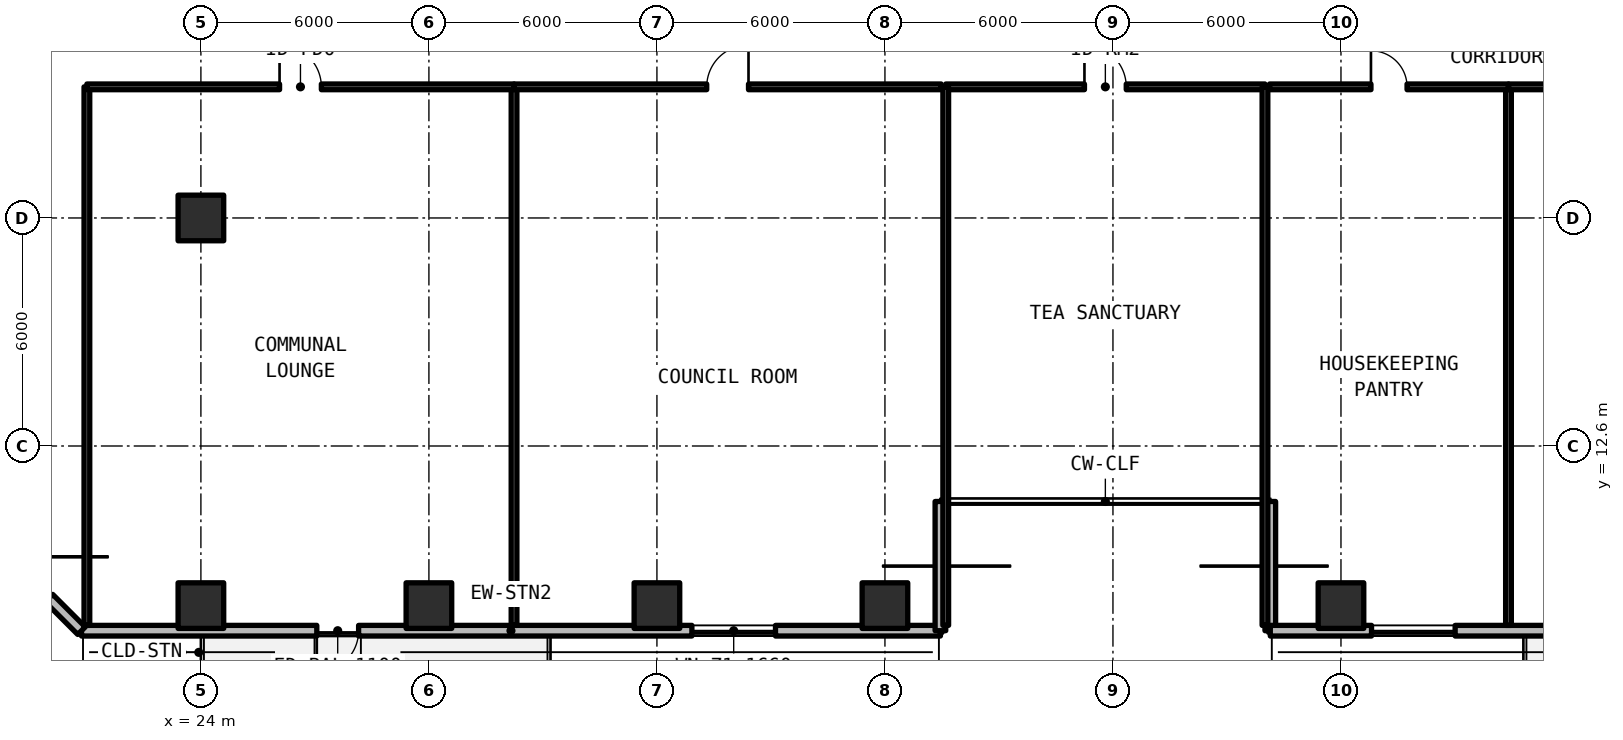
"""IFC4 building model, lengths in metres.
Left out: names, types, materials, properties, quantities, classifications, styles, units other than length and angle.
Written with IfcOpenShell. Run it as: python <this file> out.ifc"""

import sys

from ifc_helpers import new_model, si_unit, direction, frame, frame_2d, origin, origin_2d, place, context, subcontext, project, spatial, rectangle, extrude, element, fill, save


model = new_model("IFC4")
c1 = context("Model", 3, precision=1e-05, world=origin(), true_north=direction((0.0, 1.0)))
c2 = subcontext(c1, "Body", "Model", "MODEL_VIEW")
j1 = project(units=[si_unit("LENGTHUNIT", "METRE"), si_unit("PLANEANGLEUNIT", "RADIAN")], contexts=[c1])
p1 = place(None, origin())
s1 = spatial("IfcSite", under=j1, at=p1, CompositionType="ELEMENT")
p2 = place(p1, origin())
s2 = spatial("IfcBuilding", under=s1, at=p2, CompositionType="ELEMENT")
p3 = place(p2, frame((0.0, 0.0, 42.24)))
s3 = spatial("IfcBuildingStorey", under=s2, at=p3, CompositionType="ELEMENT", Elevation=42.24)
for number, where, z_axis, x_axis in (
    (1, (24.0, 18.6, 0.0), (0.0, 0.0, 1.0), (1.0, 0.0, 0.0)),
    (2, (24.0, 8.4, 0.0), (0.0, 0.0, 1.0), (1.0, 0.0, 0.0)),
    (3, (30.0, 8.4, 0.0), (0.0, 0.0, 1.0), (1.0, 0.0, 0.0)),
    (4, (36.0, 8.4, 0.0), (0.0, 0.0, 1.0), (1.0, 0.0, 0.0)),
    (5, (42.0, 8.4, 0.0), (0.0, 0.0, 1.0), (1.0, 0.0, 0.0)),
    (6, (54.0, 8.4, 0.0), (0.0, 0.0, 1.0), (1.0, 0.0, 0.0)),
):
    element("IfcColumn", number, at=place(p3, frame(where, z_axis=z_axis, x_axis=x_axis)), inside=s3, PredefinedType="COLUMN", context=c2, shape_type="SweptSolid", body=[
        extrude(rectangle(XDim=1.2, YDim=1.2, at=origin_2d()), origin(), (0.0, 0.0, 1.0), 3.3),
    ])
p4 = place(p3, frame((20.858, 7.74, 0.0), z_axis=(0.0, 0.0, 1.0), x_axis=(1.0, 0.0, 0.0)))
e7 = element("IfcWall", 7, at=p4, inside=s3, PredefinedType="SOLIDWALL", context=c2, shape_type="SweptSolid", body=[
    extrude(rectangle(XDim=22.602, YDim=0.28, at=frame_2d((11.301, 0.0))), origin(), (0.0, 0.0, 1.0), 3.08),
])
p5 = place(p4, frame((6.192, 0.0, 0.0)))
e8 = element("IfcOpeningElement", 8, at=p5, cuts=e7, PredefinedType="OPENING", context=c2, shape_type="SweptSolid", body=[
    extrude(rectangle(XDim=1.1, YDim=2.15, at=frame_2d((0.55, 1.075))), frame((0.0, 0.15, 0.0), z_axis=(0.0, -1.0, 0.0), x_axis=(1.0, 0.0, 0.0)), (0.0, 0.0, 1.0), 0.3),
])
p6 = place(p4, frame((16.062, 0.0, 0.78)))
e9 = element("IfcOpeningElement", 9, at=p6, cuts=e7, PredefinedType="OPENING", context=c2, shape_type="SweptSolid", body=[
    extrude(rectangle(XDim=2.2, YDim=1.66, at=frame_2d((1.1, 0.83))), frame((0.0, 0.15, 0.0), z_axis=(0.0, -1.0, 0.0), x_axis=(1.0, 0.0, 0.0)), (0.0, 0.0, 1.0), 0.3),
])
for number, where, z_axis, x_axis in (
    (10, (43.46, 7.74, 0.0), (0.0, 0.0, 1.0), (0.0, 1.0, 0.0)),
    (11, (52.14, 11.14, 0.0), (0.0, 0.0, 1.0), (0.0, -1.0, 0.0)),
):
    element("IfcWall", number, at=place(p3, frame(where, z_axis=z_axis, x_axis=x_axis)), inside=s3, PredefinedType="SOLIDWALL", context=c2, shape_type="SweptSolid", body=[
        extrude(rectangle(XDim=3.4, YDim=0.28, at=frame_2d((1.7, 0.0))), origin(), (0.0, 0.0, 1.0), 3.08),
    ])
p7 = place(p3, frame((52.14, 7.74, 0.0), z_axis=(0.0, 0.0, 1.0), x_axis=(1.0, 0.0, 0.0)))
e12 = element("IfcWall", 12, at=p7, inside=s3, PredefinedType="SOLIDWALL", context=c2, shape_type="SweptSolid", body=[
    extrude(rectangle(XDim=44.402, YDim=0.28, at=frame_2d((22.201, 0.0))), origin(), (0.0, 0.0, 1.0), 3.08),
])
p8 = place(p7, frame((10.71, 0.0, 0.0)))
e13 = element("IfcOpeningElement", 13, at=p8, cuts=e12, PredefinedType="OPENING", context=c2, shape_type="SweptSolid", body=[
    extrude(rectangle(XDim=1.1, YDim=2.15, at=frame_2d((0.55, 1.075))), frame((0.0, 0.15, 0.0), z_axis=(0.0, -1.0, 0.0), x_axis=(1.0, 0.0, 0.0)), (0.0, 0.0, 1.0), 0.3),
])
p9 = place(p7, frame((22.31, 0.0, 0.0)))
e14 = element("IfcOpeningElement", 14, at=p9, cuts=e12, PredefinedType="OPENING", context=c2, shape_type="SweptSolid", body=[
    extrude(rectangle(XDim=1.1, YDim=2.15, at=frame_2d((0.55, 1.075))), frame((0.0, 0.15, 0.0), z_axis=(0.0, -1.0, 0.0), x_axis=(1.0, 0.0, 0.0)), (0.0, 0.0, 1.0), 0.3),
])
p10 = place(p7, frame((33.91, 0.0, 0.0)))
e15 = element("IfcOpeningElement", 15, at=p10, cuts=e12, PredefinedType="OPENING", context=c2, shape_type="SweptSolid", body=[
    extrude(rectangle(XDim=1.1, YDim=2.15, at=frame_2d((0.55, 1.075))), frame((0.0, 0.15, 0.0), z_axis=(0.0, -1.0, 0.0), x_axis=(1.0, 0.0, 0.0)), (0.0, 0.0, 1.0), 0.3),
])
p11 = place(p7, frame((2.664, 0.0, 0.78)))
e16 = element("IfcOpeningElement", 16, at=p11, cuts=e12, PredefinedType="OPENING", context=c2, shape_type="SweptSolid", body=[
    extrude(rectangle(XDim=2.2, YDim=1.66, at=frame_2d((1.1, 0.83))), frame((0.0, 0.15, 0.0), z_axis=(0.0, -1.0, 0.0), x_axis=(1.0, 0.0, 0.0)), (0.0, 0.0, 1.0), 0.3),
])
p12 = place(p7, frame((28.534, 0.0, 0.78)))
e17 = element("IfcOpeningElement", 17, at=p12, cuts=e12, PredefinedType="OPENING", context=c2, shape_type="SweptSolid", body=[
    extrude(rectangle(XDim=2.2, YDim=1.66, at=frame_2d((1.1, 0.83))), frame((0.0, 0.15, 0.0), z_axis=(0.0, -1.0, 0.0), x_axis=(1.0, 0.0, 0.0)), (0.0, 0.0, 1.0), 0.3),
])
p13 = place(p7, frame((38.548, 0.0, 0.78)))
e18 = element("IfcOpeningElement", 18, at=p13, cuts=e12, PredefinedType="OPENING", context=c2, shape_type="SweptSolid", body=[
    extrude(rectangle(XDim=0.85, YDim=1.65, at=frame_2d((0.425, 0.825))), frame((0.0, 0.15, 0.0), z_axis=(0.0, -1.0, 0.0), x_axis=(1.0, 0.0, 0.0)), (0.0, 0.0, 1.0), 0.3),
])
p14 = place(p7, frame((40.91, 0.0, 0.78)))
e19 = element("IfcOpeningElement", 19, at=p14, cuts=e12, PredefinedType="OPENING", context=c2, shape_type="SweptSolid", body=[
    extrude(rectangle(XDim=2.2, YDim=1.66, at=frame_2d((1.1, 0.83))), frame((0.0, 0.15, 0.0), z_axis=(0.0, -1.0, 0.0), x_axis=(1.0, 0.0, 0.0)), (0.0, 0.0, 1.0), 0.3),
])
p15 = place(p3, frame((16.74, 11.858, 0.0), z_axis=(0.0, 0.0, 1.0), x_axis=(0.707106781187, -0.707106781187, 0.0)))
e20 = element("IfcWall", 20, at=p15, inside=s3, PredefinedType="SOLIDWALL", context=c2, shape_type="SweptSolid", body=[
    extrude(rectangle(XDim=5.824, YDim=0.28, at=frame_2d((2.912, 0.0))), origin(), (0.0, 0.0, 1.0), 3.08),
])
p16 = place(p15, frame((1.212, 0.0, 0.78)))
e21 = element("IfcOpeningElement", 21, at=p16, cuts=e20, PredefinedType="OPENING", context=c2, shape_type="SweptSolid", body=[
    extrude(rectangle(XDim=3.4, YDim=1.66, at=frame_2d((1.7, 0.83))), frame((0.0, 0.15, 0.0), z_axis=(0.0, -1.0, 0.0), x_axis=(1.0, 0.0, 0.0)), (0.0, 0.0, 1.0), 0.3),
])
p17 = place(p3, frame((43.6, 22.05, 0.0), z_axis=(0.0, 0.0, 1.0), x_axis=(1.0, 0.0, 0.0)))
e22 = element("IfcWall", 22, at=p17, inside=s3, PredefinedType="SOLIDWALL", context=c2, shape_type="SweptSolid", body=[
    extrude(rectangle(XDim=8.4, YDim=0.15, at=frame_2d((4.2, 0.0))), origin(), (0.0, 0.0, 1.0), 2.35),
])
p18 = place(p17, frame((3.65, 0.0, 0.0)))
e23 = element("IfcOpeningElement", 23, at=p18, cuts=e22, PredefinedType="OPENING", context=c2, shape_type="SweptSolid", body=[
    extrude(rectangle(XDim=1.1, YDim=2.15, at=frame_2d((0.55, 1.075))), frame((0.0, 0.085, 0.0), z_axis=(0.0, -1.0, 0.0), x_axis=(1.0, 0.0, 0.0)), (0.0, 0.0, 1.0), 0.17),
])
for number, where, z_axis, x_axis in (
    (24, (43.6, 7.88, 0.0), (0.0, 0.0, 1.0), (0.0, 1.0, 0.0)),
    (25, (52.0, 7.88, 0.0), (0.0, 0.0, 1.0), (0.0, 1.0, 0.0)),
    (26, (21.0, 7.88, 0.0), (0.0, 0.0, 1.0), (0.0, 1.0, 0.0)),
    (27, (32.24, 7.88, 0.0), (0.0, 0.0, 1.0), (0.0, 1.0, 0.0)),
):
    element("IfcWall", number, at=place(p3, frame(where, z_axis=z_axis, x_axis=x_axis)), inside=s3, PredefinedType="SOLIDWALL", context=c2, shape_type="SweptSolid", body=[
        extrude(rectangle(XDim=14.17, YDim=0.15, at=frame_2d((7.085, 0.0))), origin(), (0.0, 0.0, 1.0), 2.35),
    ])
p19 = place(p3, frame((21.0, 22.05, 0.0), z_axis=(0.0, 0.0, 1.0), x_axis=(1.0, 0.0, 0.0)))
e28 = element("IfcWall", 28, at=p19, inside=s3, PredefinedType="SOLIDWALL", context=c2, shape_type="SweptSolid", body=[
    extrude(rectangle(XDim=11.24, YDim=0.15, at=frame_2d((5.62, 0.0))), origin(), (0.0, 0.0, 1.0), 2.35),
])
p20 = place(p19, frame((5.07, 0.0, 0.0)))
e29 = element("IfcOpeningElement", 29, at=p20, cuts=e28, PredefinedType="OPENING", context=c2, shape_type="SweptSolid", body=[
    extrude(rectangle(XDim=1.1, YDim=2.15, at=frame_2d((0.55, 1.075))), frame((0.0, 0.085, 0.0), z_axis=(0.0, -1.0, 0.0), x_axis=(1.0, 0.0, 0.0)), (0.0, 0.0, 1.0), 0.17),
])
p21 = place(p3, frame((32.24, 22.05, 0.0), z_axis=(0.0, 0.0, 1.0), x_axis=(1.0, 0.0, 0.0)))
e30 = element("IfcWall", 30, at=p21, inside=s3, PredefinedType="SOLIDWALL", context=c2, shape_type="SweptSolid", body=[
    extrude(rectangle(XDim=11.24, YDim=0.15, at=frame_2d((5.62, 0.0))), origin(), (0.0, 0.0, 1.0), 2.35),
])
p22 = place(p21, frame((5.07, 0.0, 0.0)))
e31 = element("IfcOpeningElement", 31, at=p22, cuts=e30, PredefinedType="OPENING", context=c2, shape_type="SweptSolid", body=[
    extrude(rectangle(XDim=1.1, YDim=2.15, at=frame_2d((0.55, 1.075))), frame((0.0, 0.085, 0.0), z_axis=(0.0, -1.0, 0.0), x_axis=(1.0, 0.0, 0.0)), (0.0, 0.0, 1.0), 0.17),
])
p23 = place(p3, frame((58.408, 7.88, 0.0), z_axis=(0.0, 0.0, 1.0), x_axis=(0.0, 1.0, 0.0)))
e32 = element("IfcWall", 32, at=p23, inside=s3, PredefinedType="SOLIDWALL", context=c2, shape_type="SweptSolid", body=[
    extrude(rectangle(XDim=14.17, YDim=0.15, at=frame_2d((7.085, 0.0))), origin(), (0.0, 0.0, 1.0), 2.35),
])
p24 = place(p3, frame((52.12, 22.05, 0.0), z_axis=(0.0, 0.0, 1.0), x_axis=(1.0, 0.0, 0.0)))
e33 = element("IfcWall", 33, at=p24, inside=s3, PredefinedType="SOLIDWALL", context=c2, shape_type="SweptSolid", body=[
    extrude(rectangle(XDim=6.288, YDim=0.15, at=frame_2d((3.144, 0.0))), origin(), (0.0, 0.0, 1.0), 2.35),
])
p25 = place(p24, frame((2.669, 0.0, 0.0)))
e34 = element("IfcOpeningElement", 34, at=p25, cuts=e33, PredefinedType="OPENING", context=c2, shape_type="SweptSolid", body=[
    extrude(rectangle(XDim=0.95, YDim=2.15, at=frame_2d((0.475, 1.075))), frame((0.0, 0.085, 0.0), z_axis=(0.0, -1.0, 0.0), x_axis=(1.0, 0.0, 0.0)), (0.0, 0.0, 1.0), 0.17),
])
p26 = place(p3, frame((58.408, 22.05, 0.0), z_axis=(0.0, 0.0, 1.0), x_axis=(1.0, 0.0, 0.0)))
e35 = element("IfcWall", 35, at=p26, inside=s3, PredefinedType="SOLIDWALL", context=c2, shape_type="SweptSolid", body=[
    extrude(rectangle(XDim=9.957, YDim=0.15, at=frame_2d((4.978, 0.0))), origin(), (0.0, 0.0, 1.0), 2.35),
])
p27 = place(p26, frame((4.428, 0.0, 0.0)))
e36 = element("IfcOpeningElement", 36, at=p27, cuts=e35, PredefinedType="OPENING", context=c2, shape_type="SweptSolid", body=[
    extrude(rectangle(XDim=1.1, YDim=2.15, at=frame_2d((0.55, 1.075))), frame((0.0, 0.085, 0.0), z_axis=(0.0, -1.0, 0.0), x_axis=(1.0, 0.0, 0.0)), (0.0, 0.0, 1.0), 0.17),
])
p28 = place(p5, frame((1.1, 0.0, 0.0), z_axis=(0.0, 0.0, 1.0), x_axis=(-1.0, 0.0, 0.0)))
e37 = element("IfcDoor", 37, at=p28, inside=s3, OperationType="SINGLE_SWING_RIGHT", PredefinedType="DOOR", context=c2, shape_type="SweptSolid", body=[
    extrude(rectangle(XDim=1.1, YDim=2.15, at=frame_2d((0.55, 1.075))), frame((0.0, 0.025, 0.0), z_axis=(0.0, -1.0, 0.0), x_axis=(1.0, 0.0, 0.0)), (0.0, 0.0, 1.0), 0.05),
])
fill(e8, e37)
p29 = place(p6, origin())
e38 = element("IfcWindow", 38, at=p29, inside=s3, PartitioningType="SINGLE_PANEL", PredefinedType="WINDOW", context=c2, shape_type="SweptSolid", body=[
    extrude(rectangle(XDim=2.2, YDim=1.66, at=frame_2d((1.1, 0.83))), frame((0.0, 0.03, 0.0), z_axis=(0.0, -1.0, 0.0), x_axis=(1.0, 0.0, 0.0)), (0.0, 0.0, 1.0), 0.06),
])
fill(e9, e38)
p30 = place(p11, origin())
e39 = element("IfcWindow", 39, at=p30, inside=s3, PartitioningType="SINGLE_PANEL", PredefinedType="WINDOW", context=c2, shape_type="SweptSolid", body=[
    extrude(rectangle(XDim=2.2, YDim=1.66, at=frame_2d((1.1, 0.83))), frame((0.0, 0.03, 0.0), z_axis=(0.0, -1.0, 0.0), x_axis=(1.0, 0.0, 0.0)), (0.0, 0.0, 1.0), 0.06),
])
fill(e16, e39)
p31 = place(p18, origin())
e40 = element("IfcDoor", 40, at=p31, inside=s3, OperationType="SINGLE_SWING_LEFT", PredefinedType="DOOR", context=c2, shape_type="SweptSolid", body=[
    extrude(rectangle(XDim=1.1, YDim=2.15, at=frame_2d((0.55, 1.075))), frame((0.0, 0.025, 0.0), z_axis=(0.0, -1.0, 0.0), x_axis=(1.0, 0.0, 0.0)), (0.0, 0.0, 1.0), 0.05),
])
fill(e23, e40)
p32 = place(p20, origin())
e41 = element("IfcDoor", 41, at=p32, inside=s3, OperationType="SINGLE_SWING_LEFT", PredefinedType="DOOR", context=c2, shape_type="SweptSolid", body=[
    extrude(rectangle(XDim=1.1, YDim=2.15, at=frame_2d((0.55, 1.075))), frame((0.0, 0.025, 0.0), z_axis=(0.0, -1.0, 0.0), x_axis=(1.0, 0.0, 0.0)), (0.0, 0.0, 1.0), 0.05),
])
fill(e29, e41)
p33 = place(p22, origin())
e42 = element("IfcDoor", 42, at=p33, inside=s3, OperationType="SINGLE_SWING_RIGHT", PredefinedType="DOOR", context=c2, shape_type="SweptSolid", body=[
    extrude(rectangle(XDim=1.1, YDim=2.15, at=frame_2d((0.55, 1.075))), frame((0.0, 0.025, 0.0), z_axis=(0.0, -1.0, 0.0), x_axis=(1.0, 0.0, 0.0)), (0.0, 0.0, 1.0), 0.05),
])
fill(e31, e42)
p34 = place(p25, origin())
e43 = element("IfcDoor", 43, at=p34, inside=s3, OperationType="SINGLE_SWING_LEFT", PredefinedType="DOOR", context=c2, shape_type="SweptSolid", body=[
    extrude(rectangle(XDim=0.95, YDim=2.15, at=frame_2d((0.475, 1.075))), frame((0.0, 0.025, 0.0), z_axis=(0.0, -1.0, 0.0), x_axis=(1.0, 0.0, 0.0)), (0.0, 0.0, 1.0), 0.05),
])
fill(e34, e43)
save(model, sys.argv[1])
